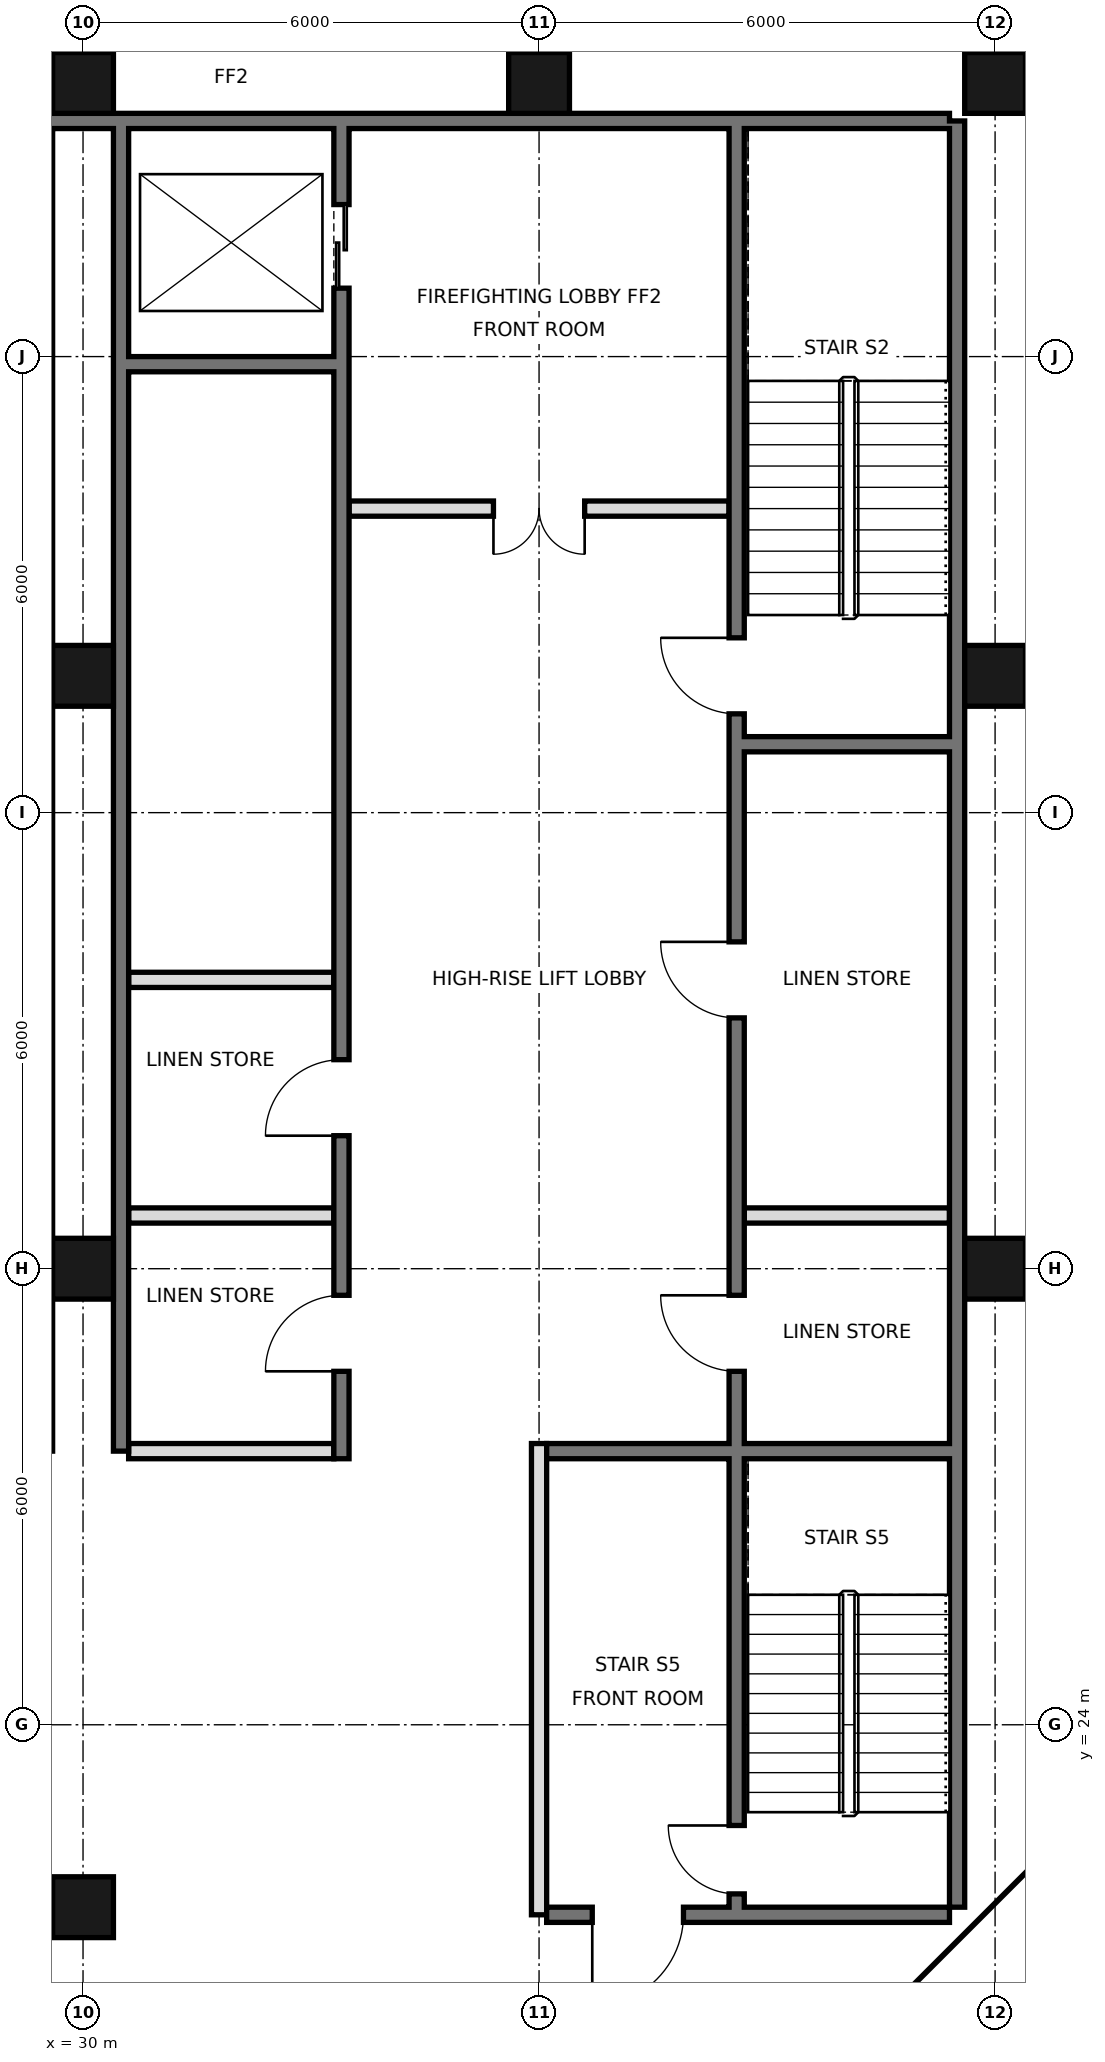
"""IFC4 building model, lengths in metres.
Left out: names, types, materials, properties, quantities, classifications, styles, units other than length and angle.
Written with IfcOpenShell. Run it as: python <this file> out.ifc"""

import sys

from ifc_helpers import new_model, si_unit, direction, frame, frame_2d, origin, origin_2d, place, context, subcontext, project, spatial, rectangle, hollow_rectangle, extrude, element, fill, save


model = new_model("IFC4")
c1 = context("Model", 3, precision=1e-05, world=origin(), true_north=direction((0.0, 1.0)))
c2 = subcontext(c1, "Body", "Model", "MODEL_VIEW")
j1 = project(units=[si_unit("LENGTHUNIT", "METRE"), si_unit("PLANEANGLEUNIT", "RADIAN")], contexts=[c1])
p1 = place(None, origin())
s1 = spatial("IfcSite", under=j1, at=p1, CompositionType="ELEMENT")
p2 = place(p1, origin())
s2 = spatial("IfcBuilding", under=s1, at=p2, CompositionType="ELEMENT")
p3 = place(p2, frame((0.0, 0.0, 349.8)))
s3 = spatial("IfcBuildingStorey", under=s2, at=p3, CompositionType="ELEMENT", Elevation=349.8)
for number, where, z_axis, x_axis in (
    (1, (30.0, 21.6, 0.0), (0.0, 0.0, 1.0), (1.0, 0.0, 0.0)),
    (2, (30.0, 30.0, 0.0), (0.0, 0.0, 1.0), (1.0, 0.0, 0.0)),
    (3, (30.0, 37.8, 0.0), (0.0, 0.0, 1.0), (1.0, 0.0, 0.0)),
    (4, (30.0, 45.6, 0.0), (0.0, 0.0, 1.0), (1.0, 0.0, 0.0)),
    (5, (36.0, 45.6, 0.0), (0.0, 0.0, 1.0), (1.0, 0.0, 0.0)),
    (6, (42.0, 30.0, 0.0), (0.0, 0.0, 1.0), (1.0, 0.0, 0.0)),
    (7, (42.0, 37.8, 0.0), (0.0, 0.0, 1.0), (1.0, 0.0, 0.0)),
    (8, (42.0, 45.6, 0.0), (0.0, 0.0, 1.0), (1.0, 0.0, 0.0)),
):
    element("IfcColumn", number, at=place(p3, frame(where, z_axis=z_axis, x_axis=x_axis)), inside=s3, PredefinedType="COLUMN", context=c2, shape_type="SweptSolid", body=[
        extrude(hollow_rectangle(XDim=0.8, YDim=0.8, WallThickness=0.025, at=origin_2d()), origin(), (0.0, 0.0, 1.0), 4.0),
    ])
p4 = place(p3, frame((41.5, 21.6, 0.0), z_axis=(0.0, 0.0, 1.0), x_axis=(0.0, 1.0, 0.0)))
e9 = element("IfcWall", 9, at=p4, inside=s3, PredefinedType="SOLIDWALL", context=c2, shape_type="SweptSolid", body=[
    extrude(rectangle(XDim=23.5, YDim=0.2, at=frame_2d((11.75, 0.0))), origin(), (0.0, 0.0, 1.0), 3.75),
])
p5 = place(p3, frame((6.6, 45.1, 0.0), z_axis=(0.0, 0.0, 1.0), x_axis=(1.0, 0.0, 0.0)))
e10 = element("IfcWall", 10, at=p5, inside=s3, PredefinedType="SOLIDWALL", context=c2, shape_type="SweptSolid", body=[
    extrude(rectangle(XDim=34.8, YDim=0.2, at=frame_2d((17.4, 0.0))), origin(), (0.0, 0.0, 1.0), 3.75),
])
p6 = place(p3, frame((30.5, 27.6, 0.0), z_axis=(0.0, 0.0, 1.0), x_axis=(0.0, 1.0, 0.0)))
e11 = element("IfcWall", 11, at=p6, inside=s3, PredefinedType="SOLIDWALL", context=c2, shape_type="SweptSolid", body=[
    extrude(rectangle(XDim=17.5, YDim=0.2, at=frame_2d((8.75, 0.0))), origin(), (0.0, 0.0, 1.0), 3.75),
])
p7 = place(p3, frame((33.4, 27.5, 0.0), z_axis=(0.0, 0.0, 1.0), x_axis=(0.0, 1.0, 0.0)))
e12 = element("IfcWall", 12, at=p7, inside=s3, PredefinedType="SOLIDWALL", context=c2, shape_type="SweptSolid", body=[
    extrude(rectangle(XDim=17.5, YDim=0.2, at=frame_2d((8.75, 0.0))), origin(), (0.0, 0.0, 1.0), 3.75),
])
p8 = place(p7, frame((15.4, 0.0, 0.0)))
e13 = element("IfcOpeningElement", 13, at=p8, cuts=e12, PredefinedType="OPENING", context=c2, shape_type="SweptSolid", body=[
    extrude(rectangle(XDim=1.1, YDim=2.1, at=frame_2d((0.55, 1.05))), frame((0.0, 0.11, 0.0), z_axis=(0.0, -1.0, 0.0), x_axis=(1.0, 0.0, 0.0)), (0.0, 0.0, 1.0), 0.22),
])
p9 = place(p7, frame((1.15, 0.0, 0.0)))
e14 = element("IfcOpeningElement", 14, at=p9, cuts=e12, PredefinedType="OPENING", context=c2, shape_type="SweptSolid", body=[
    extrude(rectangle(XDim=1.0, YDim=2.1, at=frame_2d((0.5, 1.05))), frame((0.0, 0.11, 0.0), z_axis=(0.0, -1.0, 0.0), x_axis=(1.0, 0.0, 0.0)), (0.0, 0.0, 1.0), 0.22),
])
p10 = place(p7, frame((4.25, 0.0, 0.0)))
e15 = element("IfcOpeningElement", 15, at=p10, cuts=e12, PredefinedType="OPENING", context=c2, shape_type="SweptSolid", body=[
    extrude(rectangle(XDim=1.0, YDim=2.1, at=frame_2d((0.5, 1.05))), frame((0.0, 0.11, 0.0), z_axis=(0.0, -1.0, 0.0), x_axis=(1.0, 0.0, 0.0)), (0.0, 0.0, 1.0), 0.22),
])
p11 = place(p3, frame((36.0, 21.5, 0.0), z_axis=(0.0, 0.0, 1.0), x_axis=(0.0, 1.0, 0.0)))
e16 = element("IfcWall", 16, at=p11, inside=s3, PredefinedType="PARTITIONING", context=c2, shape_type="SweptSolid", body=[
    extrude(rectangle(XDim=6.2, YDim=0.2, at=frame_2d((3.1, 0.0))), origin(), (0.0, 0.0, 1.0), 3.75),
])
p12 = place(p3, frame((38.6, 21.5, 0.0), z_axis=(0.0, 0.0, 1.0), x_axis=(0.0, 1.0, 0.0)))
e17 = element("IfcWall", 17, at=p12, inside=s3, PredefinedType="SOLIDWALL", context=c2, shape_type="SweptSolid", body=[
    extrude(rectangle(XDim=23.5, YDim=0.2, at=frame_2d((11.75, 0.0))), origin(), (0.0, 0.0, 1.0), 3.75),
])
p13 = place(p12, frame((7.15, 0.0, 0.0)))
e18 = element("IfcOpeningElement", 18, at=p13, cuts=e17, PredefinedType="OPENING", context=c2, shape_type="SweptSolid", body=[
    extrude(rectangle(XDim=1.0, YDim=2.1, at=frame_2d((0.5, 1.05))), frame((0.0, 0.11, 0.0), z_axis=(0.0, -1.0, 0.0), x_axis=(1.0, 0.0, 0.0)), (0.0, 0.0, 1.0), 0.22),
])
p14 = place(p12, frame((11.8, 0.0, 0.0)))
e19 = element("IfcOpeningElement", 19, at=p14, cuts=e17, PredefinedType="OPENING", context=c2, shape_type="SweptSolid", body=[
    extrude(rectangle(XDim=1.0, YDim=2.1, at=frame_2d((0.5, 1.05))), frame((0.0, 0.11, 0.0), z_axis=(0.0, -1.0, 0.0), x_axis=(1.0, 0.0, 0.0)), (0.0, 0.0, 1.0), 0.22),
])
p15 = place(p12, frame((15.8, 0.0, 0.0)))
e20 = element("IfcOpeningElement", 20, at=p15, cuts=e17, PredefinedType="OPENING", context=c2, shape_type="SweptSolid", body=[
    extrude(rectangle(XDim=1.0, YDim=2.1, at=frame_2d((0.5, 1.05))), frame((0.0, 0.11, 0.0), z_axis=(0.0, -1.0, 0.0), x_axis=(1.0, 0.0, 0.0)), (0.0, 0.0, 1.0), 0.22),
])
p16 = place(p12, frame((0.275, 0.0, 0.0)))
e21 = element("IfcOpeningElement", 21, at=p16, cuts=e17, PredefinedType="OPENING", context=c2, shape_type="SweptSolid", body=[
    extrude(rectangle(XDim=0.9, YDim=2.1, at=frame_2d((0.45, 1.05))), frame((0.0, 0.11, 0.0), z_axis=(0.0, -1.0, 0.0), x_axis=(1.0, 0.0, 0.0)), (0.0, 0.0, 1.0), 0.22),
])
p17 = place(p3, frame((36.1, 21.5, 0.0), z_axis=(0.0, 0.0, 1.0), x_axis=(1.0, 0.0, 0.0)))
e22 = element("IfcWall", 22, at=p17, inside=s3, PredefinedType="SOLIDWALL", context=c2, shape_type="SweptSolid", body=[
    extrude(rectangle(XDim=5.3, YDim=0.2, at=frame_2d((2.65, 0.0))), origin(), (0.0, 0.0, 1.0), 3.75),
])
p18 = place(p17, frame((0.6, 0.0, 0.0)))
e23 = element("IfcOpeningElement", 23, at=p18, cuts=e22, PredefinedType="OPENING", context=c2, shape_type="SweptSolid", body=[
    extrude(rectangle(XDim=1.2, YDim=2.1, at=frame_2d((0.6, 1.05))), frame((0.0, 0.11, 0.0), z_axis=(0.0, -1.0, 0.0), x_axis=(1.0, 0.0, 0.0)), (0.0, 0.0, 1.0), 0.22),
])
p19 = place(p3, frame((30.6, 27.6, 0.0), z_axis=(0.0, 0.0, 1.0), x_axis=(1.0, 0.0, 0.0)))
e24 = element("IfcWall", 24, at=p19, inside=s3, PredefinedType="PARTITIONING", context=c2, shape_type="SweptSolid", body=[
    extrude(rectangle(XDim=2.7, YDim=0.2, at=frame_2d((1.35, 0.0))), origin(), (0.0, 0.0, 1.0), 3.75),
])
p20 = place(p3, frame((36.1, 27.6, 0.0), z_axis=(0.0, 0.0, 1.0), x_axis=(1.0, 0.0, 0.0)))
e25 = element("IfcWall", 25, at=p20, inside=s3, PredefinedType="SOLIDWALL", context=c2, shape_type="SweptSolid", body=[
    extrude(rectangle(XDim=5.3, YDim=0.2, at=frame_2d((2.65, 0.0))), origin(), (0.0, 0.0, 1.0), 3.75),
])
for number, where, z_axis, x_axis in (
    (26, (30.6, 30.7, 0.0), (0.0, 0.0, 1.0), (1.0, 0.0, 0.0)),
    (27, (38.7, 30.7, 0.0), (0.0, 0.0, 1.0), (1.0, 0.0, 0.0)),
    (28, (30.6, 33.8, 0.0), (0.0, 0.0, 1.0), (1.0, 0.0, 0.0)),
):
    element("IfcWall", number, at=place(p3, frame(where, z_axis=z_axis, x_axis=x_axis)), inside=s3, PredefinedType="PARTITIONING", context=c2, shape_type="SweptSolid", body=[
        extrude(rectangle(XDim=2.7, YDim=0.2, at=frame_2d((1.35, 0.0))), origin(), (0.0, 0.0, 1.0), 3.75),
    ])
p21 = place(p3, frame((38.7, 36.9, 0.0), z_axis=(0.0, 0.0, 1.0), x_axis=(1.0, 0.0, 0.0)))
e29 = element("IfcWall", 29, at=p21, inside=s3, PredefinedType="SOLIDWALL", context=c2, shape_type="SweptSolid", body=[
    extrude(rectangle(XDim=2.7, YDim=0.2, at=frame_2d((1.35, 0.0))), origin(), (0.0, 0.0, 1.0), 3.75),
])
p22 = place(p3, frame((33.5, 40.0, 0.0), z_axis=(0.0, 0.0, 1.0), x_axis=(1.0, 0.0, 0.0)))
e30 = element("IfcWall", 30, at=p22, inside=s3, PredefinedType="PARTITIONING", context=c2, shape_type="SweptSolid", body=[
    extrude(rectangle(XDim=5.0, YDim=0.2, at=frame_2d((2.5, 0.0))), origin(), (0.0, 0.0, 1.0), 3.75),
])
p23 = place(p22, frame((1.9, 0.0, 0.0)))
e31 = element("IfcOpeningElement", 31, at=p23, cuts=e30, PredefinedType="OPENING", context=c2, shape_type="SweptSolid", body=[
    extrude(rectangle(XDim=1.2, YDim=2.1, at=frame_2d((0.6, 1.05))), frame((0.0, 0.11, 0.0), z_axis=(0.0, -1.0, 0.0), x_axis=(1.0, 0.0, 0.0)), (0.0, 0.0, 1.0), 0.22),
])
p24 = place(p3, frame((30.6, 41.9, 0.0), z_axis=(0.0, 0.0, 1.0), x_axis=(1.0, 0.0, 0.0)))
e32 = element("IfcWall", 32, at=p24, inside=s3, PredefinedType="SOLIDWALL", context=c2, shape_type="SweptSolid", body=[
    extrude(rectangle(XDim=2.7, YDim=0.2, at=frame_2d((1.35, 0.0))), origin(), (0.0, 0.0, 1.0), 3.75),
])
p25 = place(p18, frame((1.2, 0.0, 0.0), z_axis=(0.0, 0.0, 1.0), x_axis=(-1.0, 0.0, 0.0)))
e33 = element("IfcDoor", 33, at=p25, inside=s3, OperationType="SINGLE_SWING_RIGHT", PredefinedType="DOOR", context=c2, shape_type="SweptSolid", body=[
    extrude(rectangle(XDim=1.2, YDim=2.1, at=frame_2d((0.6, 1.05))), frame((0.0, 0.025, 0.0), z_axis=(0.0, -1.0, 0.0), x_axis=(1.0, 0.0, 0.0)), (0.0, 0.0, 1.0), 0.05),
])
fill(e23, e33)
p26 = place(p23, frame((1.2, 0.0, 0.0), z_axis=(0.0, 0.0, 1.0), x_axis=(-1.0, 0.0, 0.0)))
e34 = element("IfcDoor", 34, at=p26, inside=s3, OperationType="DOUBLE_DOOR_SINGLE_SWING", PredefinedType="DOOR", context=c2, shape_type="SweptSolid", body=[
    extrude(rectangle(XDim=1.2, YDim=2.1, at=frame_2d((0.6, 1.05))), frame((0.0, 0.025, 0.0), z_axis=(0.0, -1.0, 0.0), x_axis=(1.0, 0.0, 0.0)), (0.0, 0.0, 1.0), 0.05),
])
fill(e31, e34)
p27 = place(p8, origin())
e35 = element("IfcDoor", 35, at=p27, inside=s3, OperationType="DOUBLE_DOOR_SLIDING", PredefinedType="DOOR", context=c2, shape_type="SweptSolid", body=[
    extrude(rectangle(XDim=1.1, YDim=2.1, at=frame_2d((0.55, 1.05))), frame((0.0, 0.025, 0.0), z_axis=(0.0, -1.0, 0.0), x_axis=(1.0, 0.0, 0.0)), (0.0, 0.0, 1.0), 0.05),
])
fill(e13, e35)
p28 = place(p13, frame((1.0, 0.0, 0.0), z_axis=(0.0, 0.0, 1.0), x_axis=(-1.0, 0.0, 0.0)))
e36 = element("IfcDoor", 36, at=p28, inside=s3, OperationType="SINGLE_SWING_LEFT", PredefinedType="DOOR", context=c2, shape_type="SweptSolid", body=[
    extrude(rectangle(XDim=1.0, YDim=2.1, at=frame_2d((0.5, 1.05))), frame((0.0, 0.025, 0.0), z_axis=(0.0, -1.0, 0.0), x_axis=(1.0, 0.0, 0.0)), (0.0, 0.0, 1.0), 0.05),
])
fill(e18, e36)
p29 = place(p14, frame((1.0, 0.0, 0.0), z_axis=(0.0, 0.0, 1.0), x_axis=(-1.0, 0.0, 0.0)))
e37 = element("IfcDoor", 37, at=p29, inside=s3, OperationType="SINGLE_SWING_LEFT", PredefinedType="DOOR", context=c2, shape_type="SweptSolid", body=[
    extrude(rectangle(XDim=1.0, YDim=2.1, at=frame_2d((0.5, 1.05))), frame((0.0, 0.025, 0.0), z_axis=(0.0, -1.0, 0.0), x_axis=(1.0, 0.0, 0.0)), (0.0, 0.0, 1.0), 0.05),
])
fill(e19, e37)
p30 = place(p9, origin())
e38 = element("IfcDoor", 38, at=p30, inside=s3, OperationType="SINGLE_SWING_LEFT", PredefinedType="DOOR", context=c2, shape_type="SweptSolid", body=[
    extrude(rectangle(XDim=1.0, YDim=2.1, at=frame_2d((0.5, 1.05))), frame((0.0, 0.025, 0.0), z_axis=(0.0, -1.0, 0.0), x_axis=(1.0, 0.0, 0.0)), (0.0, 0.0, 1.0), 0.05),
])
fill(e14, e38)
p31 = place(p10, origin())
e39 = element("IfcDoor", 39, at=p31, inside=s3, OperationType="SINGLE_SWING_LEFT", PredefinedType="DOOR", context=c2, shape_type="SweptSolid", body=[
    extrude(rectangle(XDim=1.0, YDim=2.1, at=frame_2d((0.5, 1.05))), frame((0.0, 0.025, 0.0), z_axis=(0.0, -1.0, 0.0), x_axis=(1.0, 0.0, 0.0)), (0.0, 0.0, 1.0), 0.05),
])
fill(e15, e39)
p32 = place(p15, frame((1.0, 0.0, 0.0), z_axis=(0.0, 0.0, 1.0), x_axis=(-1.0, 0.0, 0.0)))
e40 = element("IfcDoor", 40, at=p32, inside=s3, OperationType="SINGLE_SWING_LEFT", PredefinedType="DOOR", context=c2, shape_type="SweptSolid", body=[
    extrude(rectangle(XDim=1.0, YDim=2.1, at=frame_2d((0.5, 1.05))), frame((0.0, 0.025, 0.0), z_axis=(0.0, -1.0, 0.0), x_axis=(1.0, 0.0, 0.0)), (0.0, 0.0, 1.0), 0.05),
])
fill(e20, e40)
p33 = place(p16, frame((0.9, 0.0, 0.0), z_axis=(0.0, 0.0, 1.0), x_axis=(-1.0, 0.0, 0.0)))
e41 = element("IfcDoor", 41, at=p33, inside=s3, OperationType="SINGLE_SWING_LEFT", PredefinedType="DOOR", context=c2, shape_type="SweptSolid", body=[
    extrude(rectangle(XDim=0.9, YDim=2.1, at=frame_2d((0.45, 1.05))), frame((0.0, 0.025, 0.0), z_axis=(0.0, -1.0, 0.0), x_axis=(1.0, 0.0, 0.0)), (0.0, 0.0, 1.0), 0.05),
])
fill(e21, e41)
save(model, sys.argv[1])
